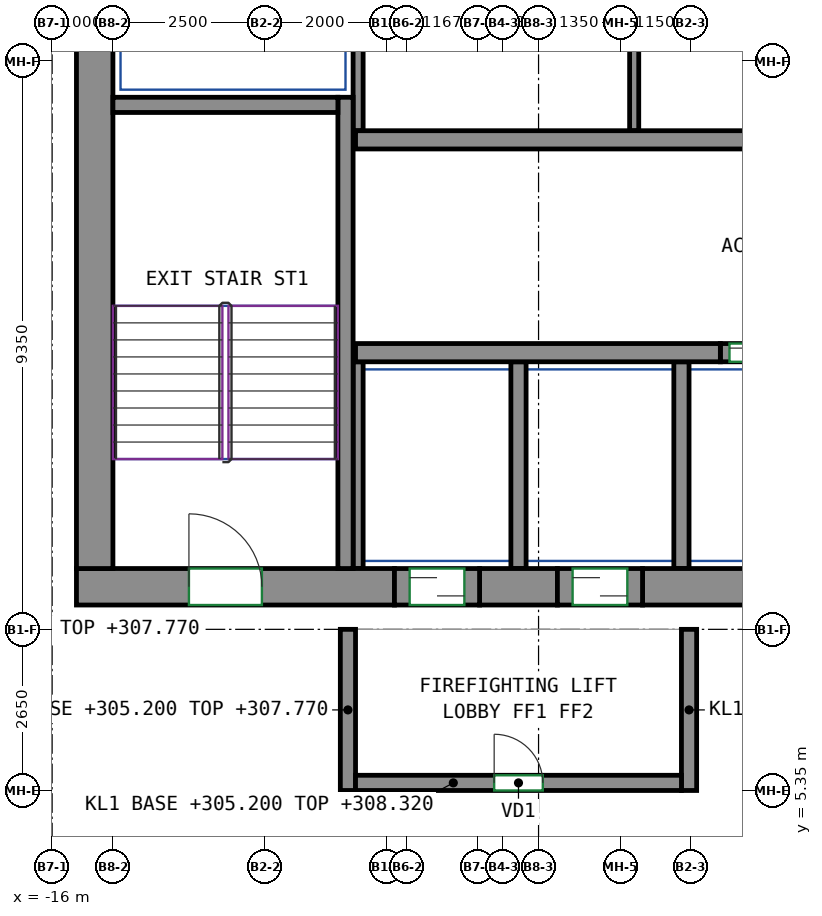
"""IFC4 building model, lengths in metres.
Left out: names, types, materials, properties, quantities, classifications, styles, units other than length and angle.
Written with IfcOpenShell. Run it as: python <this file> out.ifc"""

import sys

from ifc_helpers import new_model, si_unit, direction, frame, frame_2d, origin, place, context, subcontext, project, spatial, rectangle, extrude, source, transform, mapped, element, fill, save


model = new_model("IFC4")
c1 = context("Model", 3, precision=1e-05, world=origin(), true_north=direction((0.0, 1.0)))
c2 = subcontext(c1, "Body", "Model", "MODEL_VIEW")
j1 = project(units=[si_unit("LENGTHUNIT", "METRE"), si_unit("PLANEANGLEUNIT", "RADIAN")], contexts=[c1])
p1 = place(None, origin())
s1 = spatial("IfcSite", under=j1, at=p1, CompositionType="ELEMENT")
p2 = place(p1, origin())
s2 = spatial("IfcBuilding", under=s1, at=p2, CompositionType="ELEMENT")
p3 = place(p2, frame((0.0, 0.0, 305.2)))
s3 = spatial("IfcBuildingStorey", under=s2, at=p3, CompositionType="ELEMENT", Elevation=305.2)
m1 = source(origin(), c2, "Body", "SweptSolid", [
    extrude(rectangle(XDim=5.23, YDim=0.6, at=frame_2d((2.615, 0.0))), origin(), (0.0, 0.0, 1.0), 3.12),
])
p4 = place(p3, frame((-15.6, 8.7, 0.0), z_axis=(0.0, 0.0, 1.0), x_axis=(1.0, 0.0, 0.0)))
e1 = element("IfcWall", 1, at=p4, inside=s3, PredefinedType="SHEAR", context=c2, shape_type="MappedRepresentation", body=[
    mapped(m1, transform((0.0, 0.0, 0.0))),
])
p5 = place(p4, frame((1.85, 0.0, 0.0)))
e2 = element("IfcOpeningElement", 2, at=p5, cuts=e1, PredefinedType="OPENING", context=c2, shape_type="SweptSolid", body=[
    extrude(rectangle(XDim=1.2, YDim=2.1, at=frame_2d((0.6, 1.05))), frame((0.0, 0.31, 0.0), z_axis=(0.0, -1.0, 0.0), x_axis=(1.0, 0.0, 0.0)), (0.0, 0.0, 1.0), 0.62),
])
m2 = source(origin(), c2, "Body", "SweptSolid", [
    extrude(rectangle(XDim=1.28, YDim=0.6, at=frame_2d((0.64, 0.0))), origin(), (0.0, 0.0, 1.0), 3.12),
])
p6 = place(p3, frame((-8.97, 8.7, 0.0), z_axis=(0.0, 0.0, 1.0), x_axis=(1.0, 0.0, 0.0)))
e3 = element("IfcWall", 3, at=p6, inside=s3, PredefinedType="SHEAR", context=c2, shape_type="MappedRepresentation", body=[
    mapped(m2, transform((0.0, 0.0, 0.0))),
])
m3 = source(origin(), c2, "Body", "SweptSolid", [
    extrude(rectangle(XDim=14.18, YDim=0.6, at=frame_2d((7.09, 0.0))), origin(), (0.0, 0.0, 1.0), 3.12),
])
p7 = place(p3, frame((-6.29, 8.7, 0.0), z_axis=(0.0, 0.0, 1.0), x_axis=(1.0, 0.0, 0.0)))
e4 = element("IfcWall", 4, at=p7, inside=s3, PredefinedType="SHEAR", context=c2, shape_type="MappedRepresentation", body=[
    mapped(m3, transform((0.0, 0.0, 0.0))),
])
m4 = source(origin(), c2, "Body", "SweptSolid", [
    extrude(rectangle(XDim=12.0, YDim=0.6, at=frame_2d((6.0, 0.0))), origin(), (0.0, 0.0, 1.0), 3.12),
])
p8 = place(p3, frame((-15.3, 9.0, 0.0), z_axis=(0.0, 0.0, 1.0), x_axis=(0.0, 1.0, 0.0)))
e5 = element("IfcWall", 5, at=p8, inside=s3, PredefinedType="SHEAR", context=c2, shape_type="MappedRepresentation", body=[
    mapped(m4, transform((0.0, 0.0, 0.0))),
])
m5 = source(origin(), c2, "Body", "SweptSolid", [
    extrude(rectangle(XDim=7.75, YDim=0.25, at=frame_2d((3.875, 0.0))), origin(), (0.0, 0.0, 1.0), 3.12),
])
p9 = place(p3, frame((-11.175, 9.0, 0.0), z_axis=(0.0, 0.0, 1.0), x_axis=(0.0, 1.0, 0.0)))
e6 = element("IfcWall", 6, at=p9, inside=s3, PredefinedType="SHEAR", context=c2, shape_type="MappedRepresentation", body=[
    mapped(m5, transform((0.0, 0.0, 0.0))),
])
m6 = source(origin(), c2, "Body", "SweptSolid", [
    extrude(rectangle(XDim=3.7, YDim=0.25, at=frame_2d((1.85, 0.0))), origin(), (0.0, 0.0, 1.0), 3.12),
])
p10 = place(p3, frame((-15.0, 16.625, 0.0), z_axis=(0.0, 0.0, 1.0), x_axis=(1.0, 0.0, 0.0)))
e7 = element("IfcWall", 7, at=p10, inside=s3, PredefinedType="SHEAR", context=c2, shape_type="MappedRepresentation", body=[
    mapped(m6, transform((0.0, 0.0, 0.0))),
])
m7 = source(origin(), c2, "Body", "SweptSolid", [
    extrude(rectangle(XDim=6.0, YDim=0.3, at=frame_2d((3.0, 0.0))), origin(), (0.0, 0.0, 1.0), 3.12),
])
p11 = place(p3, frame((-11.01, 12.55, 0.0), z_axis=(0.0, 0.0, 1.0), x_axis=(1.0, 0.0, 0.0)))
e8 = element("IfcWall", 8, at=p11, inside=s3, PredefinedType="SHEAR", context=c2, shape_type="MappedRepresentation", body=[
    mapped(m7, transform((0.0, 0.0, 0.0))),
])
m8 = source(origin(), c2, "Body", "SweptSolid", [
    extrude(rectangle(XDim=22.08, YDim=0.3, at=frame_2d((11.04, 0.0))), origin(), (0.0, 0.0, 1.0), 3.12),
])
p12 = place(p3, frame((-11.01, 16.05, 0.0), z_axis=(0.0, 0.0, 1.0), x_axis=(1.0, 0.0, 0.0)))
e9 = element("IfcWall", 9, at=p12, inside=s3, PredefinedType="SHEAR", context=c2, shape_type="MappedRepresentation", body=[
    mapped(m8, transform((0.0, 0.0, 0.0))),
])
m9 = source(origin(), c2, "Body", "SweptSolid", [
    extrude(rectangle(XDim=1.4, YDim=0.3, at=frame_2d((0.7, 0.0))), origin(), (0.0, 0.0, 1.0), 3.12),
])
p13 = place(p3, frame((-5.01, 12.55, 0.0), z_axis=(0.0, 0.0, 1.0), x_axis=(1.0, 0.0, 0.0)))
e10 = element("IfcWall", 10, at=p13, inside=s3, PredefinedType="PARTITIONING", context=c2, shape_type="MappedRepresentation", body=[
    mapped(m9, transform((0.0, 0.0, 0.0))),
])
p14 = place(p13, frame((0.15, 0.0, 0.0)))
e11 = element("IfcOpeningElement", 11, at=p14, cuts=e10, PredefinedType="OPENING", context=c2, shape_type="SweptSolid", body=[
    extrude(rectangle(XDim=1.1, YDim=2.1, at=frame_2d((0.55, 1.05))), frame((0.0, 0.16, 0.0), z_axis=(0.0, -1.0, 0.0), x_axis=(1.0, 0.0, 0.0)), (0.0, 0.0, 1.0), 0.32),
])
m10 = source(origin(), c2, "Body", "SweptSolid", [
    extrude(rectangle(XDim=2.65, YDim=0.25, at=frame_2d((1.325, 0.0))), origin(), (0.0, 0.0, 1.0), 2.57),
])
for number, where, z_axis, x_axis in (
    (12, (-11.135, 5.35, 0.0), (0.0, 0.0, 1.0), (0.0, 1.0, 0.0)),
    (13, (-5.525, 5.35, 0.0), (0.0, 0.0, 1.0), (0.0, 1.0, 0.0)),
):
    element("IfcWall", number, at=place(p3, frame(where, z_axis=z_axis, x_axis=x_axis)), inside=s3, PredefinedType="PARTITIONING", context=c2, shape_type="MappedRepresentation", body=[
        mapped(m10, transform((0.0, 0.0, 0.0))),
    ])
m11 = source(origin(), c2, "Body", "SweptSolid", [
    extrude(rectangle(XDim=5.36, YDim=0.25, at=frame_2d((2.68, 0.0))), origin(), (0.0, 0.0, 1.0), 3.12),
])
p15 = place(p3, frame((-11.01, 5.475, 0.0), z_axis=(0.0, 0.0, 1.0), x_axis=(1.0, 0.0, 0.0)))
e14 = element("IfcWall", 14, at=p15, inside=s3, PredefinedType="PARTITIONING", context=c2, shape_type="MappedRepresentation", body=[
    mapped(m11, transform((0.0, 0.0, 0.0))),
])
p16 = place(p15, frame((2.28, 0.0, 0.0)))
e15 = element("IfcOpeningElement", 15, at=p16, cuts=e14, PredefinedType="OPENING", context=c2, shape_type="SweptSolid", body=[
    extrude(rectangle(XDim=0.8, YDim=2.0, at=frame_2d((0.4, 1.0))), frame((0.0, 0.135, 0.0), z_axis=(0.0, -1.0, 0.0), x_axis=(1.0, 0.0, 0.0)), (0.0, 0.0, 1.0), 0.27),
])
m12 = source(origin(), c2, "Body", "SweptSolid", [
    extrude(rectangle(XDim=4.8, YDim=0.165, at=frame_2d((2.4, 0.0))), origin(), (0.0, 0.0, 1.0), 3.12),
])
p17 = place(p3, frame((-10.968, 16.2, 0.0), z_axis=(0.0, 0.0, 1.0), x_axis=(0.0, 1.0, 0.0)))
e16 = element("IfcWall", 16, at=p17, inside=s3, PredefinedType="PARTITIONING", context=c2, shape_type="MappedRepresentation", body=[
    mapped(m12, transform((0.0, 0.0, 0.0))),
])
m13 = source(origin(), c2, "Body", "SweptSolid", [
    extrude(rectangle(XDim=3.4, YDim=0.165, at=frame_2d((1.7, 0.0))), origin(), (0.0, 0.0, 1.0), 3.12),
])
p18 = place(p3, frame((-10.968, 9.0, 0.0), z_axis=(0.0, 0.0, 1.0), x_axis=(0.0, 1.0, 0.0)))
e17 = element("IfcWall", 17, at=p18, inside=s3, PredefinedType="PARTITIONING", context=c2, shape_type="MappedRepresentation", body=[
    mapped(m13, transform((0.0, 0.0, 0.0))),
])
m14 = source(origin(), c2, "Body", "SweptSolid", [
    extrude(rectangle(XDim=3.4, YDim=0.25, at=frame_2d((1.7, 0.0))), origin(), (0.0, 0.0, 1.0), 3.12),
])
for number, where, z_axis, x_axis in (
    (18, (-5.65, 9.0, 0.0), (0.0, 0.0, 1.0), (0.0, 1.0, 0.0)),
    (19, (-8.33, 9.0, 0.0), (0.0, 0.0, 1.0), (0.0, 1.0, 0.0)),
):
    element("IfcWall", number, at=place(p3, frame(where, z_axis=z_axis, x_axis=x_axis)), inside=s3, PredefinedType="PARTITIONING", context=c2, shape_type="MappedRepresentation", body=[
        mapped(m14, transform((0.0, 0.0, 0.0))),
    ])
m15 = source(origin(), c2, "Body", "SweptSolid", [
    extrude(rectangle(XDim=4.8, YDim=0.15, at=frame_2d((2.4, 0.0))), origin(), (0.0, 0.0, 1.0), 3.12),
])
p19 = place(p3, frame((-6.427, 16.2, 0.0), z_axis=(0.0, 0.0, 1.0), x_axis=(0.0, 1.0, 0.0)))
e20 = element("IfcWall", 20, at=p19, inside=s3, PredefinedType="PARTITIONING", context=c2, shape_type="MappedRepresentation", body=[
    mapped(m15, transform((0.0, 0.0, 0.0))),
])
m16 = source(origin(), c2, "Body", "SweptSolid", [
    extrude(rectangle(XDim=1.4, YDim=0.6, at=frame_2d((0.7, 0.0))), origin(), (0.0, 0.0, 1.0), 2.7),
])
p20 = place(p3, frame((-10.37, 8.7, 0.0), z_axis=(0.0, 0.0, 1.0), x_axis=(1.0, 0.0, 0.0)))
e21 = element("IfcWall", 21, at=p20, inside=s3, PredefinedType="PARTITIONING", context=c2, shape_type="MappedRepresentation", body=[
    mapped(m16, transform((0.0, 0.0, 0.0))),
])
p21 = place(p20, frame((0.25, 0.0, 0.0)))
e22 = element("IfcOpeningElement", 22, at=p21, cuts=e21, PredefinedType="OPENING", context=c2, shape_type="SweptSolid", body=[
    extrude(rectangle(XDim=0.9, YDim=2.1, at=frame_2d((0.45, 1.05))), frame((0.0, 0.31, 0.0), z_axis=(0.0, -1.0, 0.0), x_axis=(1.0, 0.0, 0.0)), (0.0, 0.0, 1.0), 0.62),
])
m17 = source(origin(), c2, "Body", "SweptSolid", [
    extrude(rectangle(XDim=1.4, YDim=0.6, at=frame_2d((0.7, 0.0))), origin(), (0.0, 0.0, 1.0), 2.7),
])
p22 = place(p3, frame((-7.69, 8.7, 0.0), z_axis=(0.0, 0.0, 1.0), x_axis=(1.0, 0.0, 0.0)))
e23 = element("IfcWall", 23, at=p22, inside=s3, PredefinedType="PARTITIONING", context=c2, shape_type="MappedRepresentation", body=[
    mapped(m17, transform((0.0, 0.0, 0.0))),
])
p23 = place(p22, frame((0.25, 0.0, 0.0)))
e24 = element("IfcOpeningElement", 24, at=p23, cuts=e23, PredefinedType="OPENING", context=c2, shape_type="SweptSolid", body=[
    extrude(rectangle(XDim=0.9, YDim=2.1, at=frame_2d((0.45, 1.05))), frame((0.0, 0.31, 0.0), z_axis=(0.0, -1.0, 0.0), x_axis=(1.0, 0.0, 0.0)), (0.0, 0.0, 1.0), 0.62),
])
p24 = place(p16, origin())
e25 = element("IfcDoor", 25, at=p24, inside=s3, OperationType="SINGLE_SWING_LEFT", PredefinedType="DOOR", context=c2, shape_type="SweptSolid", body=[
    extrude(rectangle(XDim=0.8, YDim=2.0, at=frame_2d((0.4, 1.0))), frame((0.0, 0.025, 0.0), z_axis=(0.0, -1.0, 0.0), x_axis=(1.0, 0.0, 0.0)), (0.0, 0.0, 1.0), 0.05),
])
fill(e15, e25)
p25 = place(p21, origin())
e26 = element("IfcDoor", 26, at=p25, inside=s3, OperationType="SLIDING_TO_LEFT", PredefinedType="DOOR", context=c2, shape_type="SweptSolid", body=[
    extrude(rectangle(XDim=0.9, YDim=2.1, at=frame_2d((0.45, 1.05))), frame((0.0, 0.205, 0.0), z_axis=(0.0, -1.0, 0.0), x_axis=(1.0, 0.0, 0.0)), (0.0, 0.0, 1.0), 0.05),
])
fill(e22, e26)
p26 = place(p23, origin())
e27 = element("IfcDoor", 27, at=p26, inside=s3, OperationType="SLIDING_TO_RIGHT", PredefinedType="DOOR", context=c2, shape_type="SweptSolid", body=[
    extrude(rectangle(XDim=0.9, YDim=2.1, at=frame_2d((0.45, 1.05))), frame((0.0, 0.205, 0.0), z_axis=(0.0, -1.0, 0.0), x_axis=(1.0, 0.0, 0.0)), (0.0, 0.0, 1.0), 0.05),
])
fill(e24, e27)
p27 = place(p14, origin())
e28 = element("IfcDoor", 28, at=p27, inside=s3, OperationType="DOUBLE_DOOR_SLIDING", PredefinedType="DOOR", context=c2, shape_type="SweptSolid", body=[
    extrude(rectangle(XDim=1.1, YDim=2.1, at=frame_2d((0.55, 1.05))), frame((0.0, 0.025, 0.0), z_axis=(0.0, -1.0, 0.0), x_axis=(1.0, 0.0, 0.0)), (0.0, 0.0, 1.0), 0.05),
])
fill(e11, e28)
p28 = place(p5, origin())
e29 = element("IfcDoor", 29, at=p28, inside=s3, OperationType="DOUBLE_DOOR_SINGLE_SWING", PredefinedType="DOOR", context=c2, shape_type="SweptSolid", body=[
    extrude(rectangle(XDim=1.2, YDim=2.1, at=frame_2d((0.6, 1.05))), frame((0.0, 0.205, 0.0), z_axis=(0.0, -1.0, 0.0), x_axis=(1.0, 0.0, 0.0)), (0.0, 0.0, 1.0), 0.05),
])
fill(e2, e29)
save(model, sys.argv[1])
